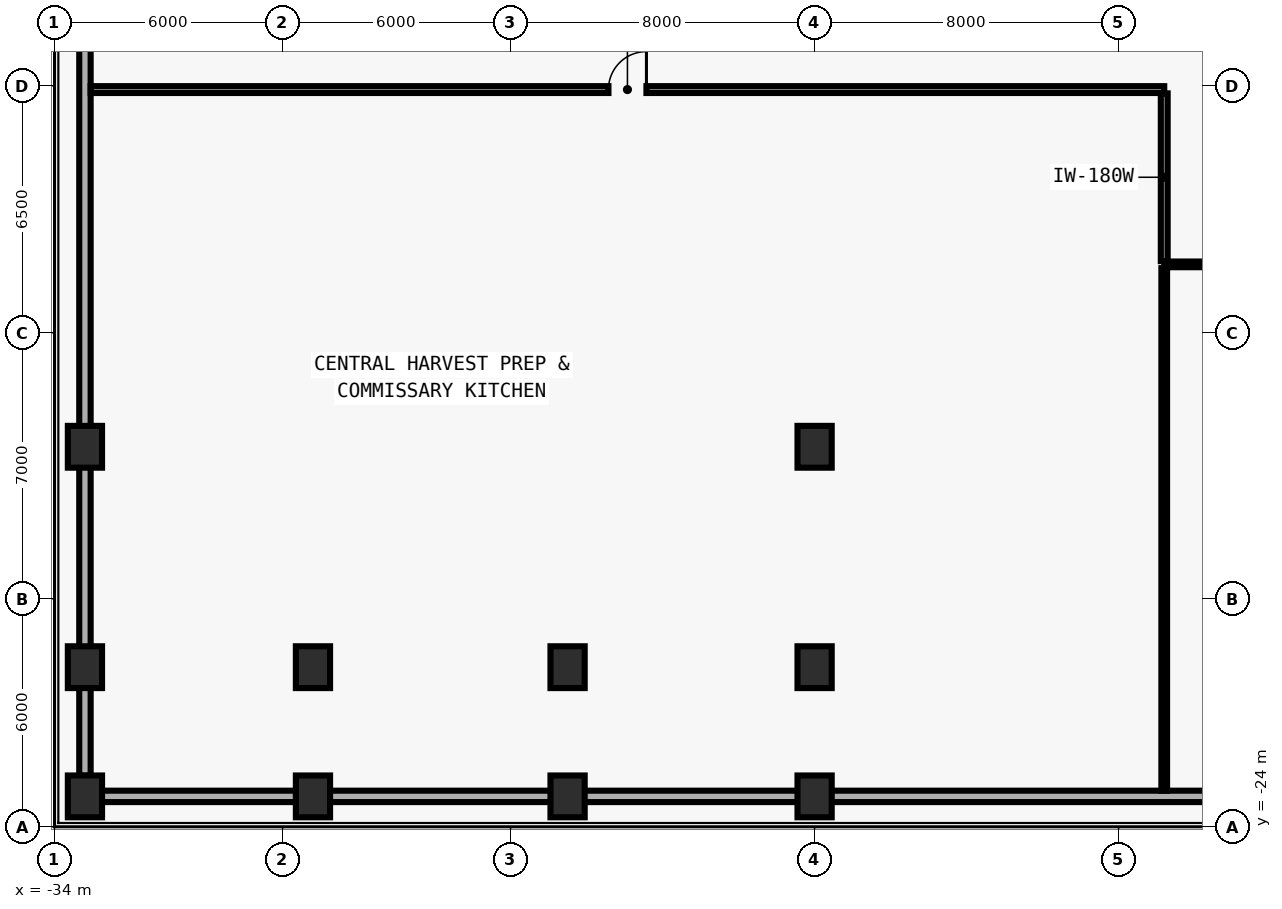
"""IFC4 building model, lengths in metres.
Left out: names, types, materials, properties, quantities, classifications, styles, units other than length and angle.
Written with IfcOpenShell. Run it as: python <this file> out.ifc"""

import sys

from ifc_helpers import new_model, si_unit, direction, frame, frame_2d, origin, origin_2d, place, context, subcontext, project, spatial, rectangle, extrude, element, fill, save


model = new_model("IFC4")
c1 = context("Model", 3, precision=1e-05, world=origin(), true_north=direction((0.0, 1.0)))
c2 = subcontext(c1, "Body", "Model", "MODEL_VIEW")
j1 = project(units=[si_unit("LENGTHUNIT", "METRE"), si_unit("PLANEANGLEUNIT", "RADIAN")], contexts=[c1])
p1 = place(None, origin())
s1 = spatial("IfcSite", under=j1, at=p1, CompositionType="ELEMENT")
p2 = place(p1, origin())
s2 = spatial("IfcBuilding", under=s1, at=p2, CompositionType="ELEMENT")
p3 = place(p2, frame((0.0, 0.0, 4.6)))
s3 = spatial("IfcBuildingStorey", under=s2, at=p3, CompositionType="ELEMENT", Elevation=4.6)
for number, where, z_axis, x_axis in (
    (1, (-33.2, -23.2, 0.0), (0.0, 0.0, 1.0), (1.0, 0.0, 0.0)),
    (2, (-33.2, -19.8, 0.0), (0.0, 0.0, 1.0), (1.0, 0.0, 0.0)),
    (3, (-33.2, -14.0, 0.0), (0.0, 0.0, 1.0), (1.0, 0.0, 0.0)),
    (4, (-27.2, -23.2, 0.0), (0.0, 0.0, 1.0), (1.0, 0.0, 0.0)),
    (5, (-27.2, -19.8, 0.0), (0.0, 0.0, 1.0), (1.0, 0.0, 0.0)),
    (6, (-20.5, -23.2, 0.0), (0.0, 0.0, 1.0), (1.0, 0.0, 0.0)),
    (7, (-20.5, -19.8, 0.0), (0.0, 0.0, 1.0), (1.0, 0.0, 0.0)),
    (8, (-14.0, -23.2, 0.0), (0.0, 0.0, 1.0), (1.0, 0.0, 0.0)),
    (9, (-14.0, -19.8, 0.0), (0.0, 0.0, 1.0), (1.0, 0.0, 0.0)),
    (10, (-14.0, -14.0, 0.0), (0.0, 0.0, 1.0), (1.0, 0.0, 0.0)),
):
    element("IfcColumn", number, at=place(p3, frame(where, z_axis=z_axis, x_axis=x_axis)), inside=s3, PredefinedType="COLUMN", context=c2, shape_type="SweptSolid", body=[
        extrude(rectangle(XDim=0.9, YDim=1.1, at=origin_2d()), origin(), (0.0, 0.0, 1.0), 4.575),
    ])
p4 = place(p3, frame((-33.2, -22.655, 0.0), z_axis=(0.0, 0.0, 1.0), x_axis=(0.0, 1.0, 0.0)))
e11 = element("IfcWall", 11, at=p4, inside=s3, PredefinedType="SOLIDWALL", context=c2, shape_type="SweptSolid", body=[
    extrude(rectangle(XDim=45.31, YDim=0.3, at=frame_2d((22.655, 0.0))), origin(), (0.0, 0.0, 1.0), 3.35),
])
p5 = place(p4, frame((29.0, 0.0, 0.85)))
e12 = element("IfcOpeningElement", 12, at=p5, cuts=e11, PredefinedType="OPENING", context=c2, shape_type="SweptSolid", body=[
    extrude(rectangle(XDim=3.0, YDim=2.1, at=frame_2d((1.5, 1.05))), frame((0.0, 0.16, 0.0), z_axis=(0.0, -1.0, 0.0), x_axis=(1.0, 0.0, 0.0)), (0.0, 0.0, 1.0), 0.32),
])
p6 = place(p3, frame((32.755, -23.2, 0.0), z_axis=(0.0, 0.0, 1.0), x_axis=(-1.0, 0.0, 0.0)))
e13 = element("IfcWall", 13, at=p6, inside=s3, PredefinedType="SOLIDWALL", context=c2, shape_type="SweptSolid", body=[
    extrude(rectangle(XDim=65.51, YDim=0.3, at=frame_2d((32.755, 0.0))), origin(), (0.0, 0.0, 1.0), 3.35),
])
p7 = place(p6, frame((29.0, 0.0, 0.85)))
e14 = element("IfcOpeningElement", 14, at=p7, cuts=e13, PredefinedType="OPENING", context=c2, shape_type="SweptSolid", body=[
    extrude(rectangle(XDim=3.0, YDim=2.1, at=frame_2d((1.5, 1.05))), frame((0.0, 0.16, 0.0), z_axis=(0.0, -1.0, 0.0), x_axis=(1.0, 0.0, 0.0)), (0.0, 0.0, 1.0), 0.32),
])
p8 = place(p3, frame((-33.05, -4.6, 0.0), z_axis=(0.0, 0.0, 1.0), x_axis=(1.0, 0.0, 0.0)))
e15 = element("IfcWall", 15, at=p8, inside=s3, PredefinedType="PLUMBINGWALL", context=c2, shape_type="SweptSolid", body=[
    extrude(rectangle(XDim=28.25, YDim=0.18, at=frame_2d((14.125, 0.0))), origin(), (0.0, 0.0, 1.0), 4.28),
])
p9 = place(p8, frame((13.625, 0.0, 0.0)))
e16 = element("IfcOpeningElement", 16, at=p9, cuts=e15, PredefinedType="OPENING", context=c2, shape_type="SweptSolid", body=[
    extrude(rectangle(XDim=1.0, YDim=2.1, at=frame_2d((0.5, 1.05))), frame((0.0, 0.1, 0.0), z_axis=(0.0, -1.0, 0.0), x_axis=(1.0, 0.0, 0.0)), (0.0, 0.0, 1.0), 0.2),
])
p10 = place(p3, frame((-4.8, -9.2, 0.0), z_axis=(0.0, 0.0, 1.0), x_axis=(1.0, 0.0, 0.0)))
e17 = element("IfcWall", 17, at=p10, inside=s3, PredefinedType="PARTITIONING", context=c2, shape_type="SweptSolid", body=[
    extrude(rectangle(XDim=15.6, YDim=0.15, at=frame_2d((7.8, 0.0))), origin(), (0.0, 0.0, 1.0), 4.28),
])
p11 = place(p10, frame((7.3, 0.0, 0.0)))
e18 = element("IfcOpeningElement", 18, at=p11, cuts=e17, PredefinedType="OPENING", context=c2, shape_type="SweptSolid", body=[
    extrude(rectangle(XDim=1.0, YDim=2.1, at=frame_2d((0.5, 1.05))), frame((0.0, 0.085, 0.0), z_axis=(0.0, -1.0, 0.0), x_axis=(1.0, 0.0, 0.0)), (0.0, 0.0, 1.0), 0.17),
])
p12 = place(p3, frame((-4.8, -4.7, 0.0), z_axis=(0.0, 0.0, 1.0), x_axis=(0.0, -1.0, 0.0)))
e19 = element("IfcWall", 19, at=p12, inside=s3, PredefinedType="PLUMBINGWALL", context=c2, shape_type="SweptSolid", body=[
    extrude(rectangle(XDim=4.415, YDim=0.18, at=frame_2d((2.208, 0.0))), origin(), (0.0, 0.0, 1.0), 4.28),
])
p13 = place(p3, frame((-4.8, -9.3, 0.0), z_axis=(0.0, 0.0, 1.0), x_axis=(0.0, -1.0, 0.0)))
e20 = element("IfcWall", 20, at=p13, inside=s3, PredefinedType="PARTITIONING", context=c2, shape_type="SweptSolid", body=[
    extrude(rectangle(XDim=13.75, YDim=0.15, at=frame_2d((6.875, 0.0))), origin(), (0.0, 0.0, 1.0), 4.28),
])
p14 = place(p9, origin())
e21 = element("IfcDoor", 21, at=p14, inside=s3, OperationType="SINGLE_SWING_RIGHT", PredefinedType="DOOR", context=c2, shape_type="SweptSolid", body=[
    extrude(rectangle(XDim=1.0, YDim=2.1, at=frame_2d((0.5, 1.05))), frame((0.0, 0.025, 0.0), z_axis=(0.0, -1.0, 0.0), x_axis=(1.0, 0.0, 0.0)), (0.0, 0.0, 1.0), 0.05),
])
fill(e16, e21)
save(model, sys.argv[1])
